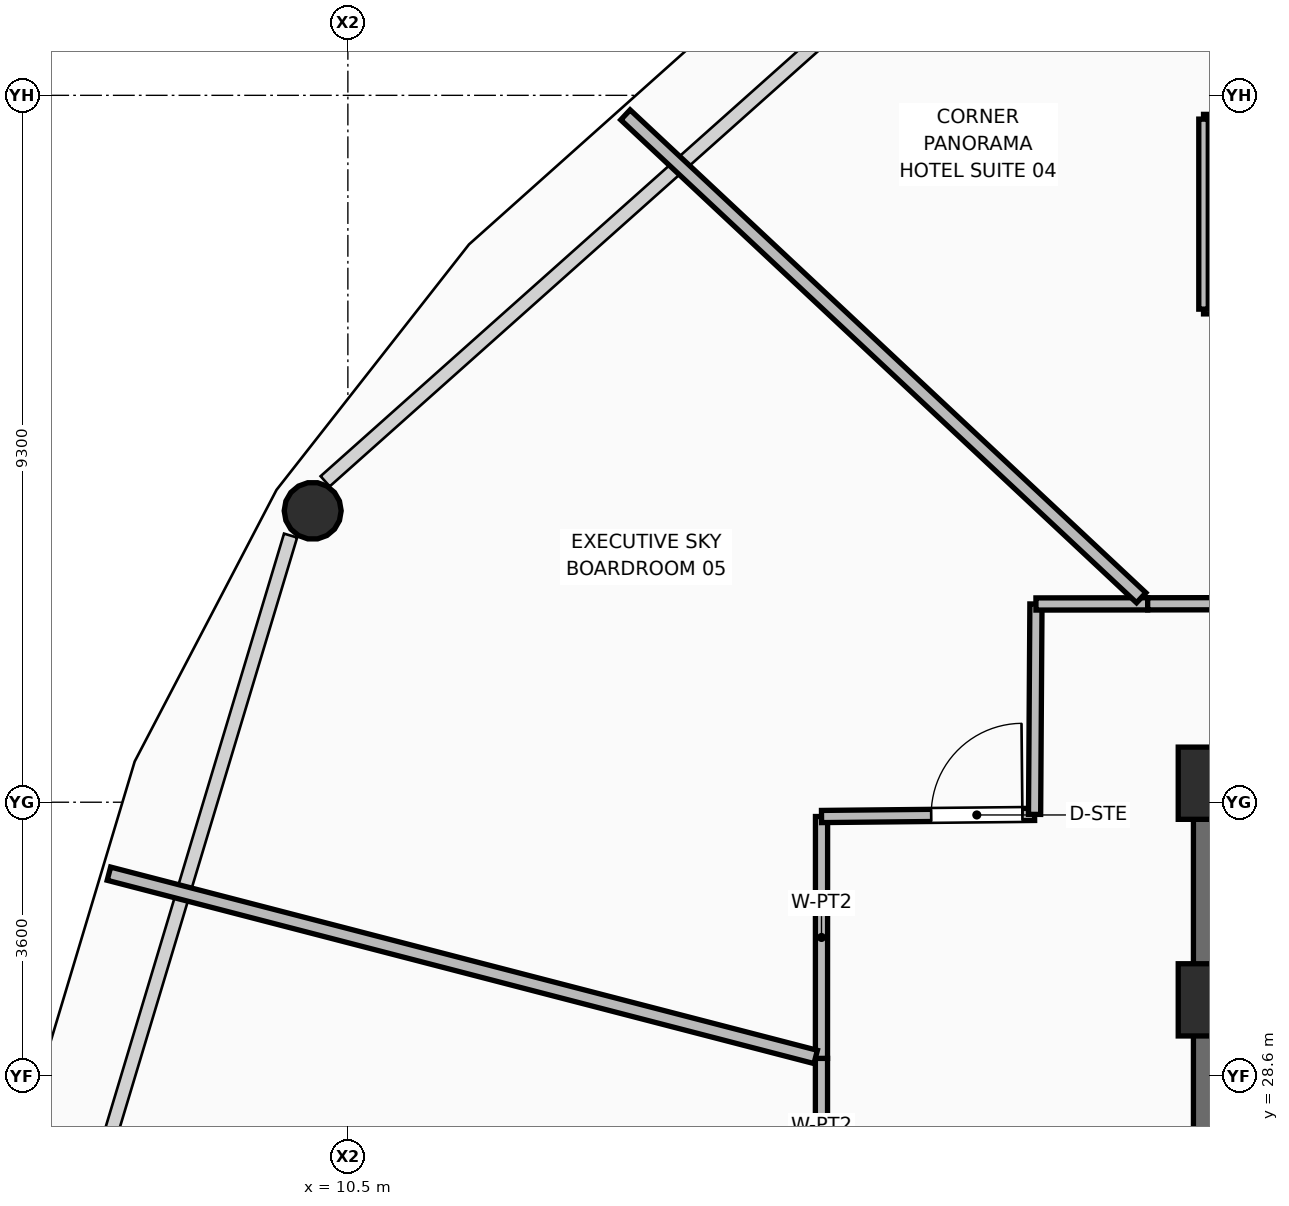
"""IFC4 building model, lengths in metres.
Left out: names, types, materials, properties, quantities, classifications, styles, units other than length and angle.
Written with IfcOpenShell. Run it as: python <this file> out.ifc"""

import sys

from ifc_helpers import new_model, si_unit, direction, frame, frame_2d, origin, origin_2d, place, context, subcontext, project, spatial, rectangle, hollow_circle, extrude, element, fill, save


model = new_model("IFC4")
c1 = context("Model", 3, precision=1e-05, world=origin(), true_north=direction((0.0, 1.0)))
c2 = subcontext(c1, "Body", "Model", "MODEL_VIEW")
j1 = project(units=[si_unit("LENGTHUNIT", "METRE"), si_unit("PLANEANGLEUNIT", "RADIAN")], contexts=[c1])
p1 = place(None, origin())
s1 = spatial("IfcSite", under=j1, at=p1, CompositionType="ELEMENT")
p2 = place(p1, origin())
s2 = spatial("IfcBuilding", under=s1, at=p2, CompositionType="ELEMENT")
p3 = place(p2, frame((0.0, 0.0, 160.95)))
s3 = spatial("IfcBuildingStorey", under=s2, at=p3, CompositionType="ELEMENT", Elevation=160.95)
for number, where, z_axis, x_axis in (
    (1, (21.9, 29.6, 0.0), (0.0, 0.0, 1.0), (1.0, 0.0, 0.0)),
    (2, (21.9, 32.45, 0.0), (0.0, 0.0, 1.0), (1.0, 0.0, 0.0)),
):
    element("IfcColumn", number, at=place(p3, frame(where, z_axis=z_axis, x_axis=x_axis)), inside=s3, PredefinedType="COLUMN", context=c2, shape_type="SweptSolid", body=[
        extrude(rectangle(XDim=0.95, YDim=0.95, at=origin_2d()), origin(), (0.0, 0.0, 1.0), 3.75),
    ])
p4 = place(p3, frame((10.037, 36.034, 0.0), z_axis=(0.059770231888, -0.030703886244, 0.997739841216), x_axis=(0.456934981397, 0.88950009712, 0.0)))
e3 = element("IfcColumn", 3, at=p4, inside=s3, PredefinedType="COLUMN", context=c2, shape_type="SweptSolid", body=[
    extrude(hollow_circle(Radius=0.375, WallThickness=0.035, at=origin_2d()), origin(), (0.0, 0.0, 1.0), 3.578),
])
p5 = place(p3, frame((21.625, 32.45, 0.0), z_axis=(0.0, 0.0, 1.0), x_axis=(1.0, 0.0, 0.0)))
e4 = element("IfcWall", 4, at=p5, inside=s3, PredefinedType="SHEAR", context=c2, shape_type="SweptSolid", body=[
    extrude(rectangle(XDim=19.75, YDim=0.55, at=frame_2d((9.875, 0.0))), origin(), (0.0, 0.0, 1.0), 3.57),
])
p6 = place(p5, frame((2.125, 0.0, 0.0)))
e5 = element("IfcOpeningElement", 5, at=p6, cuts=e4, PredefinedType="OPENING", context=c2, shape_type="SweptSolid", body=[
    extrude(rectangle(XDim=1.1, YDim=2.1, at=frame_2d((0.55, 1.05))), frame((0.0, 0.285, 0.0), z_axis=(0.0, -1.0, 0.0), x_axis=(1.0, 0.0, 0.0)), (0.0, 0.0, 1.0), 0.57),
])
p7 = place(p5, frame((15.515, 0.0, 0.0)))
e6 = element("IfcOpeningElement", 6, at=p7, cuts=e4, PredefinedType="OPENING", context=c2, shape_type="SweptSolid", body=[
    extrude(rectangle(XDim=1.0, YDim=2.1, at=frame_2d((0.5, 1.05))), frame((0.0, 0.285, 0.0), z_axis=(0.0, -1.0, 0.0), x_axis=(1.0, 0.0, 0.0)), (0.0, 0.0, 1.0), 0.57),
])
p8 = place(p5, frame((17.525, 0.0, 0.0)))
e7 = element("IfcOpeningElement", 7, at=p8, cuts=e4, PredefinedType="OPENING", context=c2, shape_type="SweptSolid", body=[
    extrude(rectangle(XDim=0.9, YDim=2.1, at=frame_2d((0.45, 1.05))), frame((0.0, 0.285, 0.0), z_axis=(0.0, -1.0, 0.0), x_axis=(1.0, 0.0, 0.0)), (0.0, 0.0, 1.0), 0.57),
])
p9 = place(p3, frame((21.9, 18.075, 0.0), z_axis=(0.0, 0.0, 1.0), x_axis=(0.0, 1.0, 0.0)))
e8 = element("IfcWall", 8, at=p9, inside=s3, PredefinedType="SHEAR", context=c2, shape_type="SweptSolid", body=[
    extrude(rectangle(XDim=14.1, YDim=0.55, at=frame_2d((7.05, 0.0))), origin(), (0.0, 0.0, 1.0), 3.57),
])
p10 = place(p3, frame((16.731, 26.142, 0.0), z_axis=(0.0, 0.0, 1.0), x_axis=(0.0, 1.0, 0.0)))
e9 = element("IfcWall", 9, at=p10, inside=s3, PredefinedType="PARTITIONING", context=c2, shape_type="SweptSolid", body=[
    extrude(rectangle(XDim=2.688, YDim=0.16, at=frame_2d((1.344, 0.0))), origin(), (0.0, 0.0, 1.0), 3.55),
])
p11 = place(p3, frame((16.731, 28.83, 0.0), z_axis=(0.0, 0.0, 1.0), x_axis=(0.000306913206, 0.999999952902, 0.0)))
e10 = element("IfcWall", 10, at=p11, inside=s3, PredefinedType="PARTITIONING", context=c2, shape_type="SweptSolid", body=[
    extrude(rectangle(XDim=3.182, YDim=0.16, at=frame_2d((1.591, 0.0))), origin(), (0.0, 0.0, 1.0), 3.55),
])
p12 = place(p3, frame((16.732, 32.012, 0.0), z_axis=(0.0, 0.0, 1.0), x_axis=(0.999949838147, 0.010016046632, 0.0)))
e11 = element("IfcWall", 11, at=p12, inside=s3, PredefinedType="PARTITIONING", context=c2, shape_type="SweptSolid", body=[
    extrude(rectangle(XDim=2.803, YDim=0.16, at=frame_2d((1.402, 0.0))), origin(), (0.0, 0.0, 1.0), 3.55),
])
p13 = place(p12, frame((1.443, 0.0, 0.0)))
e12 = element("IfcOpeningElement", 12, at=p13, cuts=e11, PredefinedType="OPENING", context=c2, shape_type="SweptSolid", body=[
    extrude(rectangle(XDim=1.2, YDim=2.1, at=frame_2d((0.6, 1.05))), frame((0.0, 0.09, 0.0), z_axis=(0.0, -1.0, 0.0), x_axis=(1.0, 0.0, 0.0)), (0.0, 0.0, 1.0), 0.18),
])
p14 = place(p3, frame((19.535, 32.04, 0.0), z_axis=(0.0, 0.0, 1.0), x_axis=(0.006526585281, 0.999978701615, 0.0)))
e13 = element("IfcWall", 13, at=p14, inside=s3, PredefinedType="PARTITIONING", context=c2, shape_type="SweptSolid", body=[
    extrude(rectangle(XDim=2.768, YDim=0.16, at=frame_2d((1.384, 0.0))), origin(), (0.0, 0.0, 1.0), 3.006),
])
p15 = place(p3, frame((19.553, 34.808, 0.0), z_axis=(0.0, 0.0, 1.0), x_axis=(0.999999117302, 0.00132868177, 0.0)))
e14 = element("IfcWall", 14, at=p15, inside=s3, PredefinedType="PARTITIONING", context=c2, shape_type="SweptSolid", body=[
    extrude(rectangle(XDim=1.47, YDim=0.16, at=frame_2d((0.735, 0.0))), origin(), (0.0, 0.0, 1.0), 3.55),
])
p16 = place(p3, frame((21.023, 34.81, 0.0), z_axis=(0.0, 0.0, 1.0), x_axis=(0.999998990869, 0.00142065491, 0.0)))
e15 = element("IfcWall", 15, at=p16, inside=s3, PredefinedType="PARTITIONING", context=c2, shape_type="SweptSolid", body=[
    extrude(rectangle(XDim=3.437, YDim=0.16, at=frame_2d((1.719, 0.0))), origin(), (0.0, 0.0, 1.0), 3.006),
])
p17 = place(p16, frame((2.077, 0.0, 0.0)))
e16 = element("IfcOpeningElement", 16, at=p17, cuts=e15, PredefinedType="OPENING", context=c2, shape_type="SweptSolid", body=[
    extrude(rectangle(XDim=1.2, YDim=2.1, at=frame_2d((0.6, 1.05))), frame((0.0, 0.09, 0.0), z_axis=(0.0, -1.0, 0.0), x_axis=(1.0, 0.0, 0.0)), (0.0, 0.0, 1.0), 0.18),
])
p18 = place(p3, frame((20.938, 34.89, 0.0), z_axis=(0.0, 0.0, 1.0), x_axis=(-0.730006343417, 0.683440369433, 0.0)))
e17 = element("IfcWall", 17, at=p18, inside=s3, PredefinedType="PARTITIONING", context=c2, shape_type="SweptSolid", body=[
    extrude(rectangle(XDim=9.296, YDim=0.18, at=frame_2d((4.648, 0.0))), origin(), (0.0, 0.0, 1.0), 2.852),
])
p19 = place(p3, frame((16.655, 28.849, 0.0), z_axis=(0.0, 0.0, 1.0), x_axis=(-0.967996440842, 0.250963922742, 0.0)))
e18 = element("IfcWall", 18, at=p19, inside=s3, PredefinedType="PARTITIONING", context=c2, shape_type="SweptSolid", body=[
    extrude(rectangle(XDim=9.606, YDim=0.18, at=frame_2d((4.803, 0.0))), origin(), (0.0, 0.0, 1.0), 2.852),
])
p20 = place(p3, frame((21.758, 38.687, 0.0), z_axis=(0.0, 0.0, 1.0), x_axis=(1.0, 0.0, 0.0)))
e19 = element("IfcWall", 19, at=p20, inside=s3, PredefinedType="PARTITIONING", context=c2, shape_type="SweptSolid", body=[
    extrude(rectangle(XDim=2.6, YDim=0.125, at=frame_2d((1.3, 0.0))), origin(), (0.0, 0.0, 1.0), 3.55),
])
p21 = place(p20, frame((0.85, 0.0, 0.0)))
e20 = element("IfcOpeningElement", 20, at=p21, cuts=e19, PredefinedType="OPENING", context=c2, shape_type="SweptSolid", body=[
    extrude(rectangle(XDim=0.9, YDim=2.1, at=frame_2d((0.45, 1.05))), frame((0.0, 0.073, 0.0), z_axis=(0.0, -1.0, 0.0), x_axis=(1.0, 0.0, 0.0)), (0.0, 0.0, 1.0), 0.145),
])
p22 = place(p3, frame((21.758, 41.187, 0.0), z_axis=(0.0, 0.0, 1.0), x_axis=(1.0, 0.0, 0.0)))
e21 = element("IfcWall", 21, at=p22, inside=s3, PredefinedType="PARTITIONING", context=c2, shape_type="SweptSolid", body=[
    extrude(rectangle(XDim=2.6, YDim=0.125, at=frame_2d((1.3, 0.0))), origin(), (0.0, 0.0, 1.0), 3.55),
])
p23 = place(p3, frame((21.758, 38.687, 0.0), z_axis=(0.0, 0.0, 1.0), x_axis=(0.0, 1.0, 0.0)))
e22 = element("IfcWall", 22, at=p23, inside=s3, PredefinedType="PARTITIONING", context=c2, shape_type="SweptSolid", body=[
    extrude(rectangle(XDim=2.5, YDim=0.125, at=frame_2d((1.25, 0.0))), origin(), (0.0, 0.0, 1.0), 3.55),
])
p24 = place(p13, origin())
e23 = element("IfcDoor", 23, at=p24, inside=s3, OperationType="SINGLE_SWING_RIGHT", PredefinedType="DOOR", context=c2, shape_type="SweptSolid", body=[
    extrude(rectangle(XDim=1.2, YDim=2.1, at=frame_2d((0.6, 1.05))), frame((0.0, 0.025, 0.0), z_axis=(0.0, -1.0, 0.0), x_axis=(1.0, 0.0, 0.0)), (0.0, 0.0, 1.0), 0.05),
])
fill(e12, e23)
save(model, sys.argv[1])
